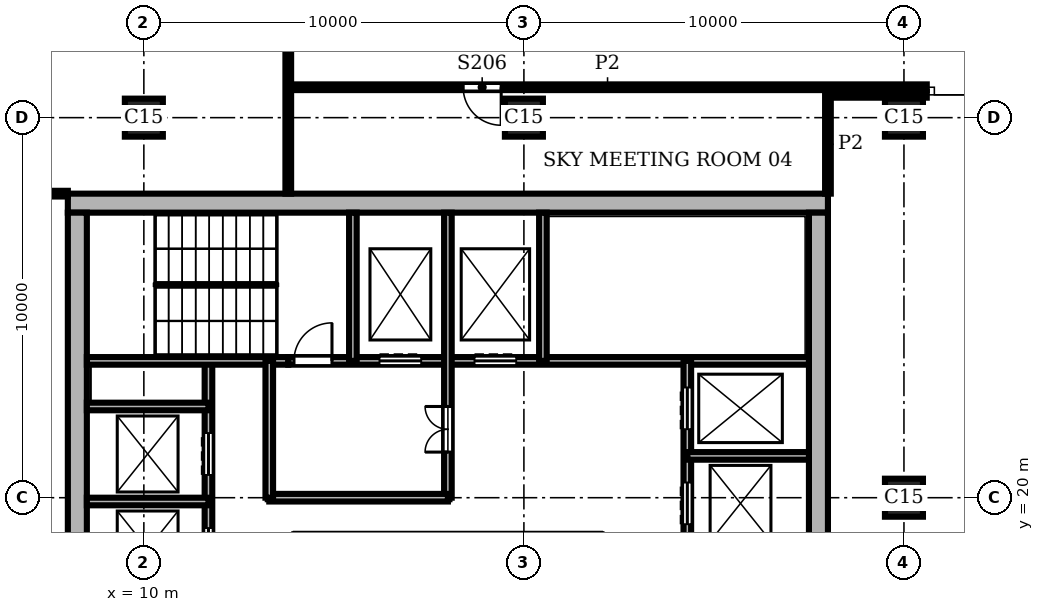
"""IFC4 building model, lengths in metres.
Left out: names, types, materials, properties, quantities, classifications, styles, units other than length and angle.
Written with IfcOpenShell. Run it as: python <this file> out.ifc"""

import sys

from ifc_helpers import new_model, si_unit, direction, frame, frame_2d, origin, origin_2d, place, context, subcontext, project, spatial, rectangle, extrude, element, fill, save


model = new_model("IFC4")
c1 = context("Model", 3, precision=1e-05, world=origin(), true_north=direction((0.0, 1.0)))
c2 = subcontext(c1, "Body", "Model", "MODEL_VIEW")
j1 = project(units=[si_unit("LENGTHUNIT", "METRE"), si_unit("PLANEANGLEUNIT", "RADIAN")], contexts=[c1])
p1 = place(None, origin())
s1 = spatial("IfcSite", under=j1, at=p1, CompositionType="ELEMENT")
p2 = place(p1, origin())
s2 = spatial("IfcBuilding", under=s1, at=p2, CompositionType="ELEMENT")
p3 = place(p2, frame((0.0, 0.0, 246.0)))
s3 = spatial("IfcBuildingStorey", under=s2, at=p3, CompositionType="ELEMENT", Elevation=246.0)
for number, where, z_axis, x_axis in (
    (1, (10.0, 30.0, 0.0), (0.0, 0.0, 1.0), (1.0, 0.0, 0.0)),
    (2, (20.0, 30.0, 0.0), (0.0, 0.0, 1.0), (1.0, 0.0, 0.0)),
    (3, (30.0, 20.0, 0.0), (0.0, 0.0, 1.0), (1.0, 0.0, 0.0)),
    (4, (30.0, 30.0, 0.0), (0.0, 0.0, 1.0), (1.0, 0.0, 0.0)),
):
    element("IfcColumn", number, at=place(p3, frame(where, z_axis=z_axis, x_axis=x_axis)), inside=s3, PredefinedType="COLUMN", context=c2, shape_type="SweptSolid", body=[
        extrude(rectangle(XDim=1.0, YDim=1.0, at=origin_2d()), origin(), (0.0, 0.0, 1.0), 5.4),
    ])
p4 = place(p3, frame((27.75, 8.5, 0.0), z_axis=(0.0, 0.0, 1.0), x_axis=(0.0, 1.0, 0.0)))
e5 = element("IfcWall", 5, at=p4, inside=s3, PredefinedType="SHEAR", context=c2, shape_type="SweptSolid", body=[
    extrude(rectangle(XDim=19.0, YDim=0.5, at=frame_2d((9.5, 0.0))), origin(), (0.0, 0.0, 1.0), 5.4),
])
p5 = place(p4, frame((4.95, 0.0, 0.0)))
e6 = element("IfcOpeningElement", 6, at=p5, cuts=e5, PredefinedType="OPENING", context=c2, shape_type="SweptSolid", body=[
    extrude(rectangle(XDim=1.6, YDim=2.1, at=frame_2d((0.8, 1.05))), frame((0.0, 0.26, 0.0), z_axis=(0.0, -1.0, 0.0), x_axis=(1.0, 0.0, 0.0)), (0.0, 0.0, 1.0), 0.52),
])
p6 = place(p3, frame((28.0, 27.75, 0.0), z_axis=(0.0, 0.0, 1.0), x_axis=(-1.0, 0.0, 0.0)))
e7 = element("IfcWall", 7, at=p6, inside=s3, PredefinedType="SHEAR", context=c2, shape_type="SweptSolid", body=[
    extrude(rectangle(XDim=20.0, YDim=0.5, at=frame_2d((10.0, 0.0))), origin(), (0.0, 0.0, 1.0), 5.4),
])
p7 = place(p3, frame((8.25, 27.5, 0.0), z_axis=(0.0, 0.0, 1.0), x_axis=(0.0, -1.0, 0.0)))
e8 = element("IfcWall", 8, at=p7, inside=s3, PredefinedType="SHEAR", context=c2, shape_type="SweptSolid", body=[
    extrude(rectangle(XDim=19.0, YDim=0.5, at=frame_2d((9.5, 0.0))), origin(), (0.0, 0.0, 1.0), 5.4),
])
p8 = place(p3, frame((8.5, 19.9, 0.0), z_axis=(0.0, 0.0, 1.0), x_axis=(1.0, 0.0, 0.0)))
e9 = element("IfcWall", 9, at=p8, inside=s3, PredefinedType="SHEAR", context=c2, shape_type="SweptSolid", body=[
    extrude(rectangle(XDim=3.2, YDim=0.2, at=frame_2d((1.6, 0.0))), origin(), (0.0, 0.0, 1.0), 5.08),
])
p9 = place(p3, frame((13.3, 20.0, 0.0), z_axis=(0.0, 0.0, 1.0), x_axis=(1.0, 0.0, 0.0)))
e10 = element("IfcWall", 10, at=p9, inside=s3, PredefinedType="SHEAR", context=c2, shape_type="SweptSolid", body=[
    extrude(rectangle(XDim=4.7, YDim=0.2, at=frame_2d((2.35, 0.0))), origin(), (0.0, 0.0, 1.0), 5.08),
])
for number, where, z_axis, x_axis in (
    (11, (24.3, 21.1, 0.0), (0.0, 0.0, 1.0), (1.0, 0.0, 0.0)),
    (12, (8.5, 22.4, 0.0), (0.0, 0.0, 1.0), (1.0, 0.0, 0.0)),
):
    element("IfcWall", number, at=place(p3, frame(where, z_axis=z_axis, x_axis=x_axis)), inside=s3, PredefinedType="SHEAR", context=c2, shape_type="SweptSolid", body=[
        extrude(rectangle(XDim=3.2, YDim=0.2, at=frame_2d((1.6, 0.0))), origin(), (0.0, 0.0, 1.0), 5.08),
    ])
p10 = place(p3, frame((8.5, 23.6, 0.0), z_axis=(0.0, 0.0, 1.0), x_axis=(1.0, 0.0, 0.0)))
e13 = element("IfcWall", 13, at=p10, inside=s3, PredefinedType="SHEAR", context=c2, shape_type="SweptSolid", body=[
    extrude(rectangle(XDim=5.3, YDim=0.2, at=frame_2d((2.65, 0.0))), origin(), (0.0, 0.0, 1.0), 5.08),
])
p11 = place(p3, frame((13.8, 23.6, 0.0), z_axis=(0.0, 0.0, 1.0), x_axis=(1.0, 0.0, 0.0)))
e14 = element("IfcWall", 14, at=p11, inside=s3, PredefinedType="SHEAR", context=c2, shape_type="SweptSolid", body=[
    extrude(rectangle(XDim=13.7, YDim=0.2, at=frame_2d((6.85, 0.0))), origin(), (0.0, 0.0, 1.0), 5.08),
])
p12 = place(p11, frame((2.4, 0.0, 0.0)))
e15 = element("IfcOpeningElement", 15, at=p12, cuts=e14, PredefinedType="OPENING", context=c2, shape_type="SweptSolid", body=[
    extrude(rectangle(XDim=1.1, YDim=2.1, at=frame_2d((0.55, 1.05))), frame((0.0, 0.11, 0.0), z_axis=(0.0, -1.0, 0.0), x_axis=(1.0, 0.0, 0.0)), (0.0, 0.0, 1.0), 0.22),
])
p13 = place(p11, frame((4.9, 0.0, 0.0)))
e16 = element("IfcOpeningElement", 16, at=p13, cuts=e14, PredefinedType="OPENING", context=c2, shape_type="SweptSolid", body=[
    extrude(rectangle(XDim=1.1, YDim=2.1, at=frame_2d((0.55, 1.05))), frame((0.0, 0.11, 0.0), z_axis=(0.0, -1.0, 0.0), x_axis=(1.0, 0.0, 0.0)), (0.0, 0.0, 1.0), 0.22),
])
p14 = place(p11, frame((0.15, 0.0, 0.0)))
e17 = element("IfcOpeningElement", 17, at=p14, cuts=e14, PredefinedType="OPENING", context=c2, shape_type="SweptSolid", body=[
    extrude(rectangle(XDim=1.0, YDim=2.1, at=frame_2d((0.5, 1.05))), frame((0.0, 0.11, 0.0), z_axis=(0.0, -1.0, 0.0), x_axis=(1.0, 0.0, 0.0)), (0.0, 0.0, 1.0), 0.22),
])
p15 = place(p3, frame((11.7, 12.4, 0.0), z_axis=(0.0, 0.0, 1.0), x_axis=(0.0, 1.0, 0.0)))
e18 = element("IfcWall", 18, at=p15, inside=s3, PredefinedType="SHEAR", context=c2, shape_type="SweptSolid", body=[
    extrude(rectangle(XDim=11.2, YDim=0.2, at=frame_2d((5.6, 0.0))), origin(), (0.0, 0.0, 1.0), 5.08),
])
p16 = place(p15, frame((0.7, 0.0, 0.0)))
e19 = element("IfcOpeningElement", 19, at=p16, cuts=e18, PredefinedType="OPENING", context=c2, shape_type="SweptSolid", body=[
    extrude(rectangle(XDim=1.1, YDim=2.1, at=frame_2d((0.55, 1.05))), frame((0.0, 0.11, 0.0), z_axis=(0.0, -1.0, 0.0), x_axis=(1.0, 0.0, 0.0)), (0.0, 0.0, 1.0), 0.22),
])
p17 = place(p15, frame((3.2, 0.0, 0.0)))
e20 = element("IfcOpeningElement", 20, at=p17, cuts=e18, PredefinedType="OPENING", context=c2, shape_type="SweptSolid", body=[
    extrude(rectangle(XDim=1.1, YDim=2.1, at=frame_2d((0.55, 1.05))), frame((0.0, 0.11, 0.0), z_axis=(0.0, -1.0, 0.0), x_axis=(1.0, 0.0, 0.0)), (0.0, 0.0, 1.0), 0.22),
])
p18 = place(p15, frame((5.7, 0.0, 0.0)))
e21 = element("IfcOpeningElement", 21, at=p18, cuts=e18, PredefinedType="OPENING", context=c2, shape_type="SweptSolid", body=[
    extrude(rectangle(XDim=1.1, YDim=2.1, at=frame_2d((0.55, 1.05))), frame((0.0, 0.11, 0.0), z_axis=(0.0, -1.0, 0.0), x_axis=(1.0, 0.0, 0.0)), (0.0, 0.0, 1.0), 0.22),
])
p19 = place(p15, frame((8.2, 0.0, 0.0)))
e22 = element("IfcOpeningElement", 22, at=p19, cuts=e18, PredefinedType="OPENING", context=c2, shape_type="SweptSolid", body=[
    extrude(rectangle(XDim=1.1, YDim=2.1, at=frame_2d((0.55, 1.05))), frame((0.0, 0.11, 0.0), z_axis=(0.0, -1.0, 0.0), x_axis=(1.0, 0.0, 0.0)), (0.0, 0.0, 1.0), 0.22),
])
p20 = place(p3, frame((13.3, 20.0, 0.0), z_axis=(0.0, 0.0, 1.0), x_axis=(0.0, 1.0, 0.0)))
e23 = element("IfcWall", 23, at=p20, inside=s3, PredefinedType="SHEAR", context=c2, shape_type="SweptSolid", body=[
    extrude(rectangle(XDim=3.6, YDim=0.2, at=frame_2d((1.8, 0.0))), origin(), (0.0, 0.0, 1.0), 5.08),
])
p21 = place(p3, frame((15.5, 23.6, 0.0), z_axis=(0.0, 0.0, 1.0), x_axis=(0.0, 1.0, 0.0)))
e24 = element("IfcWall", 24, at=p21, inside=s3, PredefinedType="SHEAR", context=c2, shape_type="SweptSolid", body=[
    extrude(rectangle(XDim=3.9, YDim=0.2, at=frame_2d((1.95, 0.0))), origin(), (0.0, 0.0, 1.0), 5.08),
])
p22 = place(p3, frame((18.0, 20.0, 0.0), z_axis=(0.0, 0.0, 1.0), x_axis=(0.0, 1.0, 0.0)))
e25 = element("IfcWall", 25, at=p22, inside=s3, PredefinedType="SHEAR", context=c2, shape_type="SweptSolid", body=[
    extrude(rectangle(XDim=7.5, YDim=0.2, at=frame_2d((3.75, 0.0))), origin(), (0.0, 0.0, 1.0), 5.08),
])
p23 = place(p22, frame((1.2, 0.0, 0.0)))
e26 = element("IfcOpeningElement", 26, at=p23, cuts=e25, PredefinedType="OPENING", context=c2, shape_type="SweptSolid", body=[
    extrude(rectangle(XDim=1.2, YDim=2.1, at=frame_2d((0.6, 1.05))), frame((0.0, 0.11, 0.0), z_axis=(0.0, -1.0, 0.0), x_axis=(1.0, 0.0, 0.0)), (0.0, 0.0, 1.0), 0.22),
])
p24 = place(p3, frame((20.5, 23.6, 0.0), z_axis=(0.0, 0.0, 1.0), x_axis=(0.0, 1.0, 0.0)))
e27 = element("IfcWall", 27, at=p24, inside=s3, PredefinedType="SHEAR", context=c2, shape_type="SweptSolid", body=[
    extrude(rectangle(XDim=3.9, YDim=0.2, at=frame_2d((1.95, 0.0))), origin(), (0.0, 0.0, 1.0), 5.08),
])
p25 = place(p3, frame((24.3, 16.1, 0.0), z_axis=(0.0, 0.0, 1.0), x_axis=(0.0, 1.0, 0.0)))
e28 = element("IfcWall", 28, at=p25, inside=s3, PredefinedType="SHEAR", context=c2, shape_type="SweptSolid", body=[
    extrude(rectangle(XDim=7.5, YDim=0.2, at=frame_2d((3.75, 0.0))), origin(), (0.0, 0.0, 1.0), 5.08),
])
p26 = place(p25, frame((0.7, 0.0, 0.0)))
e29 = element("IfcOpeningElement", 29, at=p26, cuts=e28, PredefinedType="OPENING", context=c2, shape_type="SweptSolid", body=[
    extrude(rectangle(XDim=1.1, YDim=2.1, at=frame_2d((0.55, 1.05))), frame((0.0, 0.11, 0.0), z_axis=(0.0, -1.0, 0.0), x_axis=(1.0, 0.0, 0.0)), (0.0, 0.0, 1.0), 0.22),
])
p27 = place(p25, frame((3.2, 0.0, 0.0)))
e30 = element("IfcOpeningElement", 30, at=p27, cuts=e28, PredefinedType="OPENING", context=c2, shape_type="SweptSolid", body=[
    extrude(rectangle(XDim=1.1, YDim=2.1, at=frame_2d((0.55, 1.05))), frame((0.0, 0.11, 0.0), z_axis=(0.0, -1.0, 0.0), x_axis=(1.0, 0.0, 0.0)), (0.0, 0.0, 1.0), 0.22),
])
p28 = place(p25, frame((5.7, 0.0, 0.0)))
e31 = element("IfcOpeningElement", 31, at=p28, cuts=e28, PredefinedType="OPENING", context=c2, shape_type="SweptSolid", body=[
    extrude(rectangle(XDim=1.1, YDim=2.1, at=frame_2d((0.55, 1.05))), frame((0.0, 0.11, 0.0), z_axis=(0.0, -1.0, 0.0), x_axis=(1.0, 0.0, 0.0)), (0.0, 0.0, 1.0), 0.22),
])
p29 = place(p3, frame((13.8, 28.0, 0.0), z_axis=(0.0, 0.0, 1.0), x_axis=(0.0, 1.0, 0.0)))
e32 = element("IfcWall", 32, at=p29, inside=s3, PredefinedType="PARTITIONING", context=c2, shape_type="SweptSolid", body=[
    extrude(rectangle(XDim=29.6, YDim=0.15, at=frame_2d((14.8, 0.0))), origin(), (0.0, 0.0, 1.0), 5.08),
])
p30 = place(p29, frame((20.351, 0.0, 0.0)))
e33 = element("IfcOpeningElement", 33, at=p30, cuts=e32, PredefinedType="OPENING", context=c2, shape_type="SweptSolid", body=[
    extrude(rectangle(XDim=1.8, YDim=2.1, at=frame_2d((0.9, 1.05))), frame((0.0, 0.085, 0.0), z_axis=(0.0, -1.0, 0.0), x_axis=(1.0, 0.0, 0.0)), (0.0, 0.0, 1.0), 0.17),
])
p31 = place(p3, frame((28.0, 28.0, 0.0), z_axis=(0.0, 0.0, 1.0), x_axis=(0.0, 1.0, 0.0)))
e34 = element("IfcWall", 34, at=p31, inside=s3, PredefinedType="PARTITIONING", context=c2, shape_type="SweptSolid", body=[
    extrude(rectangle(XDim=2.598, YDim=0.15, at=frame_2d((1.299, 0.0))), origin(), (0.0, 0.0, 1.0), 5.08),
])
p32 = place(p3, frame((5.6, 28.0, 0.0), z_axis=(0.0, 0.0, 1.0), x_axis=(1.0, 0.0, 0.0)))
e35 = element("IfcWall", 35, at=p32, inside=s3, PredefinedType="PARTITIONING", context=c2, shape_type="SweptSolid", body=[
    extrude(rectangle(XDim=2.4, YDim=0.15, at=frame_2d((1.2, 0.0))), origin(), (0.0, 0.0, 1.0), 5.08),
])
p33 = place(p3, frame((28.002, 30.6, 0.0), z_axis=(0.0, 0.0, 1.0), x_axis=(1.0, 0.0, 0.0)))
e36 = element("IfcWall", 36, at=p33, inside=s3, PredefinedType="PARTITIONING", context=c2, shape_type="SweptSolid", body=[
    extrude(rectangle(XDim=2.598, YDim=0.15, at=frame_2d((1.299, 0.0))), origin(), (0.0, 0.0, 1.0), 5.08),
])
p34 = place(p3, frame((13.802, 30.8, 0.0), z_axis=(0.0, 0.0, 1.0), x_axis=(1.0, 0.0, 0.0)))
e37 = element("IfcWall", 37, at=p34, inside=s3, PredefinedType="PARTITIONING", context=c2, shape_type="SweptSolid", body=[
    extrude(rectangle(XDim=16.798, YDim=0.15, at=frame_2d((8.399, 0.0))), origin(), (0.0, 0.0, 1.0), 5.08),
])
p35 = place(p34, frame((4.6, 0.0, 0.0)))
e38 = element("IfcOpeningElement", 38, at=p35, cuts=e37, PredefinedType="OPENING", context=c2, shape_type="SweptSolid", body=[
    extrude(rectangle(XDim=1.0, YDim=2.1, at=frame_2d((0.5, 1.05))), frame((0.0, 0.085, 0.0), z_axis=(0.0, -1.0, 0.0), x_axis=(1.0, 0.0, 0.0)), (0.0, 0.0, 1.0), 0.17),
])
p36 = place(p18, origin())
e39 = element("IfcDoor", 39, at=p36, inside=s3, OperationType="DOUBLE_DOOR_SLIDING", PredefinedType="DOOR", context=c2, shape_type="SweptSolid", body=[
    extrude(rectangle(XDim=1.1, YDim=2.1, at=frame_2d((0.55, 1.05))), frame((0.0, 0.025, 0.0), z_axis=(0.0, -1.0, 0.0), x_axis=(1.0, 0.0, 0.0)), (0.0, 0.0, 1.0), 0.05),
])
fill(e21, e39)
p37 = place(p19, origin())
e40 = element("IfcDoor", 40, at=p37, inside=s3, OperationType="DOUBLE_DOOR_SLIDING", PredefinedType="DOOR", context=c2, shape_type="SweptSolid", body=[
    extrude(rectangle(XDim=1.1, YDim=2.1, at=frame_2d((0.55, 1.05))), frame((0.0, 0.025, 0.0), z_axis=(0.0, -1.0, 0.0), x_axis=(1.0, 0.0, 0.0)), (0.0, 0.0, 1.0), 0.05),
])
fill(e22, e40)
p38 = place(p27, origin())
e41 = element("IfcDoor", 41, at=p38, inside=s3, OperationType="DOUBLE_DOOR_SLIDING", PredefinedType="DOOR", context=c2, shape_type="SweptSolid", body=[
    extrude(rectangle(XDim=1.1, YDim=2.1, at=frame_2d((0.55, 1.05))), frame((0.0, 0.025, 0.0), z_axis=(0.0, -1.0, 0.0), x_axis=(1.0, 0.0, 0.0)), (0.0, 0.0, 1.0), 0.05),
])
fill(e30, e41)
p39 = place(p28, origin())
e42 = element("IfcDoor", 42, at=p39, inside=s3, OperationType="DOUBLE_DOOR_SLIDING", PredefinedType="DOOR", context=c2, shape_type="SweptSolid", body=[
    extrude(rectangle(XDim=1.1, YDim=2.1, at=frame_2d((0.55, 1.05))), frame((0.0, 0.025, 0.0), z_axis=(0.0, -1.0, 0.0), x_axis=(1.0, 0.0, 0.0)), (0.0, 0.0, 1.0), 0.05),
])
fill(e31, e42)
p40 = place(p12, origin())
e43 = element("IfcDoor", 43, at=p40, inside=s3, OperationType="DOUBLE_DOOR_SLIDING", PredefinedType="DOOR", context=c2, shape_type="SweptSolid", body=[
    extrude(rectangle(XDim=1.1, YDim=2.1, at=frame_2d((0.55, 1.05))), frame((0.0, 0.025, 0.0), z_axis=(0.0, -1.0, 0.0), x_axis=(1.0, 0.0, 0.0)), (0.0, 0.0, 1.0), 0.05),
])
fill(e15, e43)
p41 = place(p13, origin())
e44 = element("IfcDoor", 44, at=p41, inside=s3, OperationType="DOUBLE_DOOR_SLIDING", PredefinedType="DOOR", context=c2, shape_type="SweptSolid", body=[
    extrude(rectangle(XDim=1.1, YDim=2.1, at=frame_2d((0.55, 1.05))), frame((0.0, 0.025, 0.0), z_axis=(0.0, -1.0, 0.0), x_axis=(1.0, 0.0, 0.0)), (0.0, 0.0, 1.0), 0.05),
])
fill(e16, e44)
p42 = place(p14, origin())
e45 = element("IfcDoor", 45, at=p42, inside=s3, OperationType="SINGLE_SWING_RIGHT", PredefinedType="DOOR", context=c2, shape_type="SweptSolid", body=[
    extrude(rectangle(XDim=1.0, YDim=2.1, at=frame_2d((0.5, 1.05))), frame((0.0, 0.025, 0.0), z_axis=(0.0, -1.0, 0.0), x_axis=(1.0, 0.0, 0.0)), (0.0, 0.0, 1.0), 0.05),
])
fill(e17, e45)
p43 = place(p23, origin())
e46 = element("IfcDoor", 46, at=p43, inside=s3, OperationType="DOUBLE_DOOR_SINGLE_SWING", PredefinedType="DOOR", context=c2, shape_type="SweptSolid", body=[
    extrude(rectangle(XDim=1.2, YDim=2.1, at=frame_2d((0.6, 1.05))), frame((0.0, 0.025, 0.0), z_axis=(0.0, -1.0, 0.0), x_axis=(1.0, 0.0, 0.0)), (0.0, 0.0, 1.0), 0.05),
])
fill(e26, e46)
p44 = place(p35, frame((1.0, 0.0, 0.0), z_axis=(0.0, 0.0, 1.0), x_axis=(-1.0, 0.0, 0.0)))
e47 = element("IfcDoor", 47, at=p44, inside=s3, OperationType="SINGLE_SWING_LEFT", PredefinedType="DOOR", context=c2, shape_type="SweptSolid", body=[
    extrude(rectangle(XDim=1.0, YDim=2.1, at=frame_2d((0.5, 1.05))), frame((0.0, 0.025, 0.0), z_axis=(0.0, -1.0, 0.0), x_axis=(1.0, 0.0, 0.0)), (0.0, 0.0, 1.0), 0.05),
])
fill(e38, e47)
save(model, sys.argv[1])
